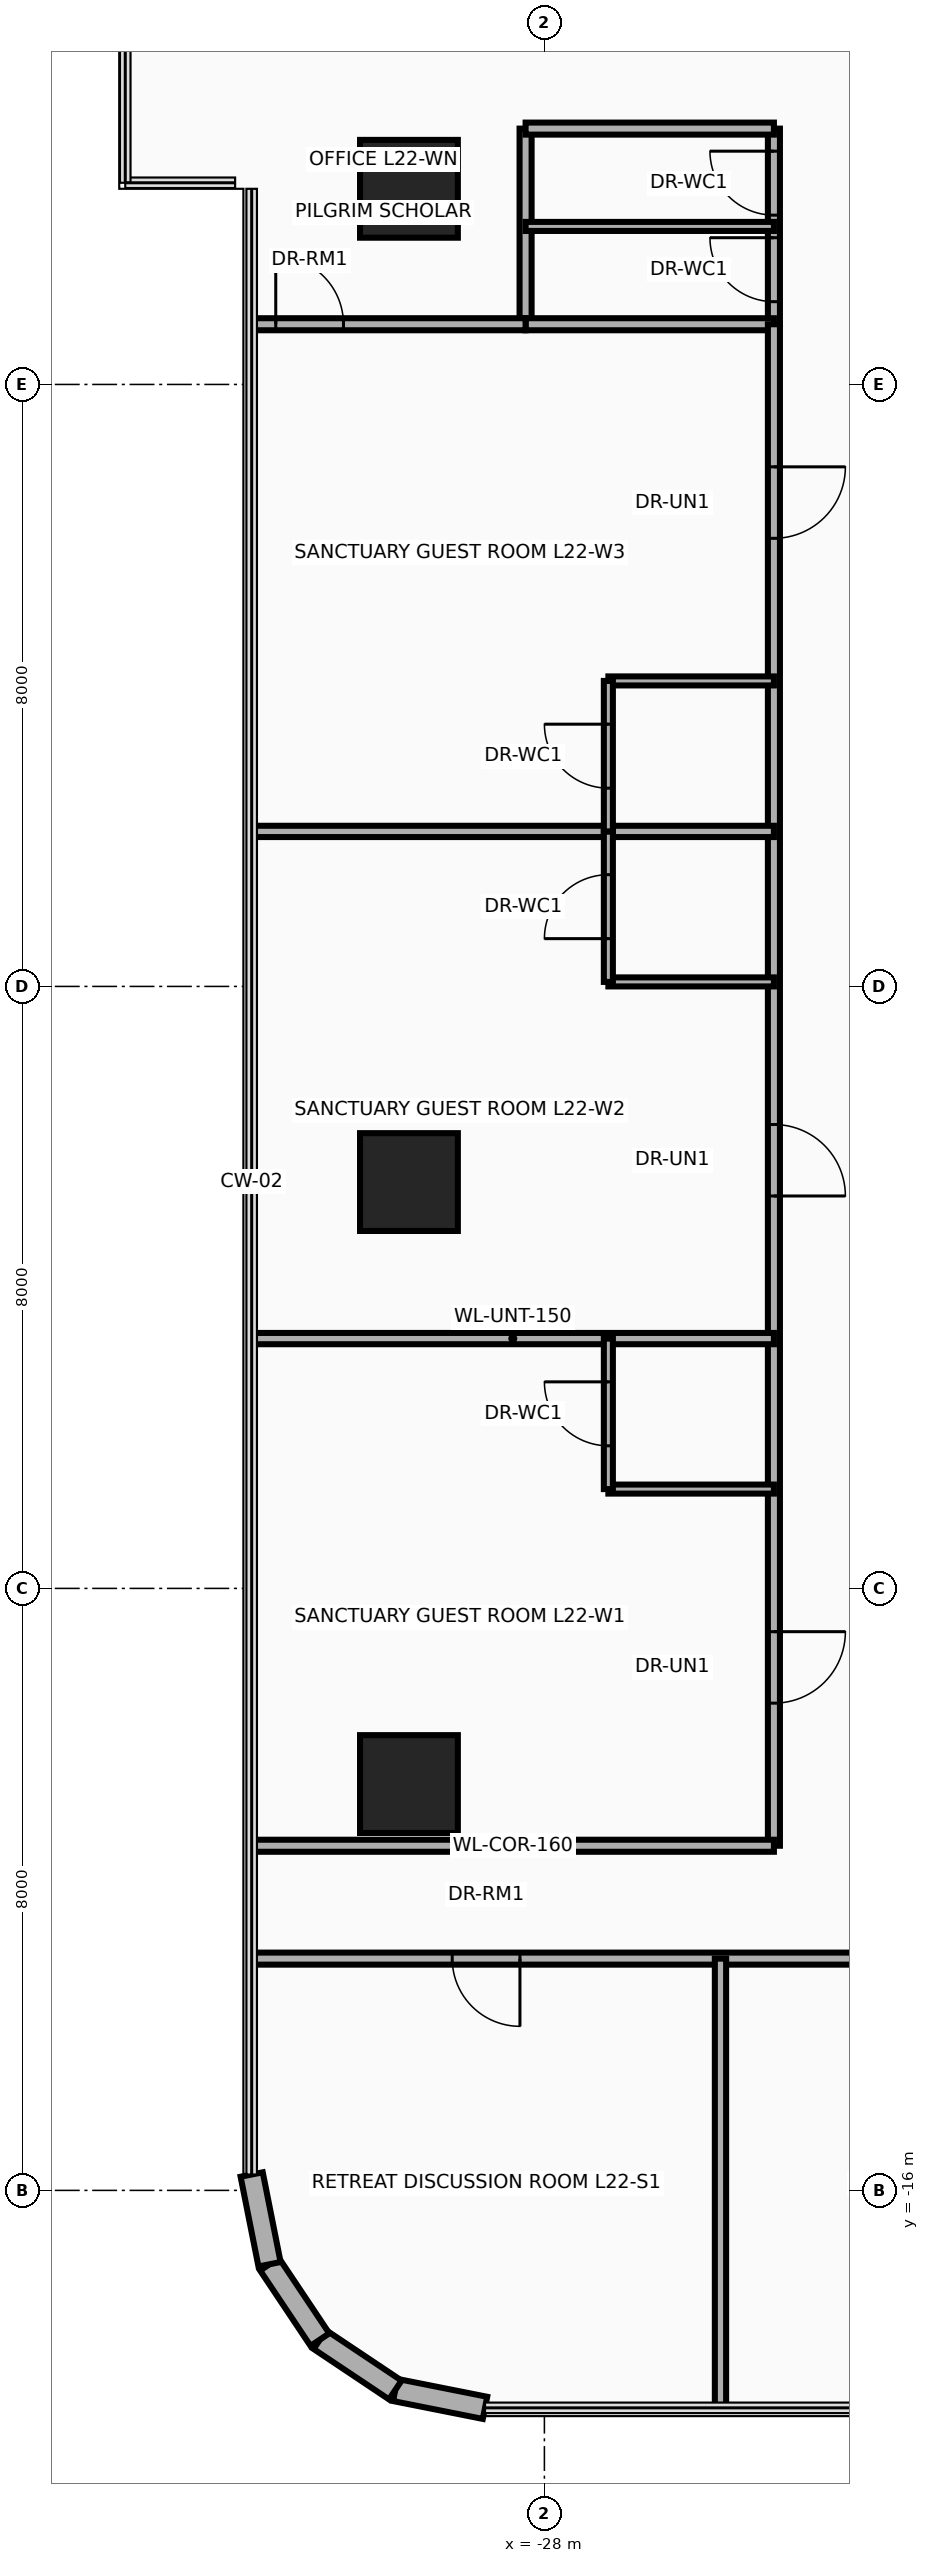
"""IFC4 building model, lengths in metres.
Left out: names, types, materials, properties, quantities, classifications, styles, units other than length and angle.
Written with IfcOpenShell. Run it as: python <this file> out.ifc"""

import sys

from ifc_helpers import new_model, si_unit, direction, frame, frame_2d, origin, origin_2d, place, context, subcontext, project, spatial, rectangle, circle, extrude, source, transform, mapped, element, fill, save


model = new_model("IFC4")
c1 = context("Model", 3, precision=1e-05, world=origin(), true_north=direction((0.0, 1.0)))
c2 = subcontext(c1, "Body", "Model", "MODEL_VIEW")
j1 = project(units=[si_unit("LENGTHUNIT", "METRE"), si_unit("PLANEANGLEUNIT", "RADIAN")], contexts=[c1])
p1 = place(None, origin())
s1 = spatial("IfcSite", under=j1, at=p1, CompositionType="ELEMENT")
p2 = place(p1, origin())
s2 = spatial("IfcBuilding", under=s1, at=p2, CompositionType="ELEMENT")
p3 = place(p2, frame((0.0, 0.0, 88.9)))
s3 = spatial("IfcBuildingStorey", under=s2, at=p3, CompositionType="ELEMENT", Elevation=88.9)
m1 = source(origin(), c2, "Body", "SweptSolid", [
    extrude(circle(Radius=0.65, at=origin_2d()), origin(), (0.0, 0.0, 1.0), 3.7),
])
for number, where, z_axis, x_axis in (
    (1, (-29.8, -10.6, 0.0), (0.0, 0.0, 1.0), (1.0, 0.0, 0.0)),
    (2, (-29.8, -2.6, 0.0), (0.0, 0.0, 1.0), (1.0, 0.0, 0.0)),
    (3, (-29.8, 10.6, 0.0), (0.0, 0.0, 1.0), (1.0, 0.0, 0.0)),
):
    element("IfcColumn", number, at=place(p3, frame(where, z_axis=z_axis, x_axis=x_axis)), inside=s3, PredefinedType="COLUMN", context=c2, shape_type="MappedRepresentation", body=[
        mapped(m1, transform((0.0, 0.0, 0.0), x_axis=(1.0, 0.0, 0.0), y_axis=(0.0, 1.0, 0.0), z_axis=(0.0, 0.0, 1.0), scale=1.0)),
    ])
p4 = place(p3, frame((-28.789, -18.89, 0.0), z_axis=(0.0, 0.0, 1.0), x_axis=(-0.980804027463, 0.194996050505, 0.0)))
e4 = element("IfcWall", 4, at=p4, inside=s3, PredefinedType="SOLIDWALL", context=c2, shape_type="SweptSolid", body=[
    extrude(rectangle(XDim=1.216, YDim=0.3, at=frame_2d((0.608, 0.0))), origin(), (0.0, 0.0, 1.0), 3.46),
])
for number, where, z_axis, x_axis in (
    (5, (-29.982, -18.653, 0.0), (0.0, 0.0, 1.0), (-0.831, 0.556, 0.0)),
    (6, (-30.983, -17.983, 0.0), (0.0, 0.0, 1.0), (-0.556, 0.831, 0.0)),
):
    element("IfcWall", number, at=place(p3, frame(where, z_axis=z_axis, x_axis=x_axis)), inside=s3, PredefinedType="SOLIDWALL", context=c2, shape_type="SweptSolid", body=[
        extrude(rectangle(XDim=1.205, YDim=0.3, at=frame_2d((0.603, 0.0))), origin(), (0.0, 0.0, 1.0), 3.46),
    ])
p5 = place(p3, frame((-31.653, -16.982, 0.0), z_axis=(0.0, 0.0, 1.0), x_axis=(-0.194996050505, 0.980804027463, 0.0)))
e7 = element("IfcWall", 7, at=p5, inside=s3, PredefinedType="SOLIDWALL", context=c2, shape_type="SweptSolid", body=[
    extrude(rectangle(XDim=1.216, YDim=0.3, at=frame_2d((0.608, 0.0))), origin(), (0.0, 0.0, 1.0), 3.46),
])
p6 = place(p3, frame((-28.25, 8.8, 0.0), z_axis=(0.0, 0.0, 1.0), x_axis=(0.0, 1.0, 0.0)))
e8 = element("IfcWall", 8, at=p6, inside=s3, PredefinedType="PARTITIONING", context=c2, shape_type="SweptSolid", body=[
    extrude(rectangle(XDim=2.6, YDim=0.16, at=frame_2d((1.3, 0.0))), origin(), (0.0, 0.0, 1.0), 2.583),
])
p7 = place(p3, frame((-24.95, 8.8, 0.0), z_axis=(0.0, 0.0, 1.0), x_axis=(0.0, 1.0, 0.0)))
e9 = element("IfcWall", 9, at=p7, inside=s3, PredefinedType="PARTITIONING", context=c2, shape_type="SweptSolid", body=[
    extrude(rectangle(XDim=2.6, YDim=0.16, at=frame_2d((1.3, 0.0))), origin(), (0.0, 0.0, 1.0), 2.583),
])
p8 = place(p7, frame((0.3, 0.0, 0.0)))
e10 = element("IfcOpeningElement", 10, at=p8, cuts=e9, PredefinedType="OPENING", context=c2, shape_type="SweptSolid", body=[
    extrude(rectangle(XDim=0.85, YDim=2.1, at=frame_2d((0.425, 1.05))), frame((0.0, 0.095, 0.0), z_axis=(0.0, -1.0, 0.0), x_axis=(1.0, 0.0, 0.0)), (0.0, 0.0, 1.0), 0.19),
])
p9 = place(p7, frame((1.45, 0.0, 0.0)))
e11 = element("IfcOpeningElement", 11, at=p9, cuts=e9, PredefinedType="OPENING", context=c2, shape_type="SweptSolid", body=[
    extrude(rectangle(XDim=0.85, YDim=2.1, at=frame_2d((0.425, 1.05))), frame((0.0, 0.095, 0.0), z_axis=(0.0, -1.0, 0.0), x_axis=(1.0, 0.0, 0.0)), (0.0, 0.0, 1.0), 0.19),
])
for number, where, z_axis, x_axis in (
    (12, (-28.25, 8.8, 0.0), (0.0, 0.0, 1.0), (1.0, 0.0, 0.0)),
    (13, (-28.25, 11.4, 0.0), (0.0, 0.0, 1.0), (1.0, 0.0, 0.0)),
):
    element("IfcWall", number, at=place(p3, frame(where, z_axis=z_axis, x_axis=x_axis)), inside=s3, PredefinedType="PARTITIONING", context=c2, shape_type="SweptSolid", body=[
        extrude(rectangle(XDim=3.3, YDim=0.16, at=frame_2d((1.65, 0.0))), origin(), (0.0, 0.0, 1.0), 3.46),
    ])
p10 = place(p3, frame((-28.25, 10.1, 0.0), z_axis=(0.0, 0.0, 1.0), x_axis=(1.0, 0.0, 0.0)))
e14 = element("IfcWall", 14, at=p10, inside=s3, PredefinedType="PARTITIONING", context=c2, shape_type="SweptSolid", body=[
    extrude(rectangle(XDim=3.3, YDim=0.12, at=frame_2d((1.65, 0.0))), origin(), (0.0, 0.0, 1.0), 3.46),
])
p11 = place(p3, frame((-24.95, -11.42, 0.0), z_axis=(0.0, 0.0, 1.0), x_axis=(0.0, 1.0, 0.0)))
e15 = element("IfcWall", 15, at=p11, inside=s3, PredefinedType="PARTITIONING", context=c2, shape_type="SweptSolid", body=[
    extrude(rectangle(XDim=20.22, YDim=0.16, at=frame_2d((10.11, 0.0))), origin(), (0.0, 0.0, 1.0), 2.583),
])
p12 = place(p11, frame((1.895, 0.0, 0.0)))
e16 = element("IfcOpeningElement", 16, at=p12, cuts=e15, PredefinedType="OPENING", context=c2, shape_type="SweptSolid", body=[
    extrude(rectangle(XDim=0.95, YDim=2.15, at=frame_2d((0.475, 1.075))), frame((0.0, 0.095, 0.0), z_axis=(0.0, -1.0, 0.0), x_axis=(1.0, 0.0, 0.0)), (0.0, 0.0, 1.0), 0.19),
])
p13 = place(p11, frame((8.635, 0.0, 0.0)))
e17 = element("IfcOpeningElement", 17, at=p13, cuts=e15, PredefinedType="OPENING", context=c2, shape_type="SweptSolid", body=[
    extrude(rectangle(XDim=0.95, YDim=2.15, at=frame_2d((0.475, 1.075))), frame((0.0, 0.095, 0.0), z_axis=(0.0, -1.0, 0.0), x_axis=(1.0, 0.0, 0.0)), (0.0, 0.0, 1.0), 0.19),
])
p14 = place(p11, frame((17.375, 0.0, 0.0)))
e18 = element("IfcOpeningElement", 18, at=p14, cuts=e15, PredefinedType="OPENING", context=c2, shape_type="SweptSolid", body=[
    extrude(rectangle(XDim=0.95, YDim=2.15, at=frame_2d((0.475, 1.075))), frame((0.0, 0.095, 0.0), z_axis=(0.0, -1.0, 0.0), x_axis=(1.0, 0.0, 0.0)), (0.0, 0.0, 1.0), 0.19),
])
p15 = place(p3, frame((-31.89, 8.8, 0.0), z_axis=(0.0, 0.0, 1.0), x_axis=(1.0, 0.0, 0.0)))
e19 = element("IfcWall", 19, at=p15, inside=s3, PredefinedType="PARTITIONING", context=c2, shape_type="SweptSolid", body=[
    extrude(rectangle(XDim=3.64, YDim=0.16, at=frame_2d((1.82, 0.0))), origin(), (0.0, 0.0, 1.0), 2.896),
])
p16 = place(p15, frame((0.32, 0.0, 0.0)))
e20 = element("IfcOpeningElement", 20, at=p16, cuts=e19, PredefinedType="OPENING", context=c2, shape_type="SweptSolid", body=[
    extrude(rectangle(XDim=0.9, YDim=2.1, at=frame_2d((0.45, 1.05))), frame((0.0, 0.095, 0.0), z_axis=(0.0, -1.0, 0.0), x_axis=(1.0, 0.0, 0.0)), (0.0, 0.0, 1.0), 0.19),
])
for number, where, z_axis, x_axis in (
    (21, (-31.89, -4.68, 0.0), (0.0, 0.0, 1.0), (1.0, 0.0, 0.0)),
    (22, (-31.89, 2.06, 0.0), (0.0, 0.0, 1.0), (1.0, 0.0, 0.0)),
):
    element("IfcWall", number, at=place(p3, frame(where, z_axis=z_axis, x_axis=x_axis)), inside=s3, PredefinedType="PARTITIONING", context=c2, shape_type="SweptSolid", body=[
        extrude(rectangle(XDim=6.94, YDim=0.15, at=frame_2d((3.47, 0.0))), origin(), (0.0, 0.0, 1.0), 2.896),
    ])
p17 = place(p3, frame((-27.15, -6.68, 0.0), z_axis=(0.0, 0.0, 1.0), x_axis=(1.0, 0.0, 0.0)))
e23 = element("IfcWall", 23, at=p17, inside=s3, PredefinedType="PARTITIONING", context=c2, shape_type="SweptSolid", body=[
    extrude(rectangle(XDim=2.2, YDim=0.12, at=frame_2d((1.1, 0.0))), origin(), (0.0, 0.0, 1.0), 2.979),
])
p18 = place(p3, frame((-27.15, -6.68, 0.0), z_axis=(0.0, 0.0, 1.0), x_axis=(0.0, 1.0, 0.0)))
e24 = element("IfcWall", 24, at=p18, inside=s3, PredefinedType="PARTITIONING", context=c2, shape_type="SweptSolid", body=[
    extrude(rectangle(XDim=2.0, YDim=0.12, at=frame_2d((1.0, 0.0))), origin(), (0.0, 0.0, 1.0), 2.979),
])
p19 = place(p18, frame((0.575, 0.0, 0.0)))
e25 = element("IfcOpeningElement", 25, at=p19, cuts=e24, PredefinedType="OPENING", context=c2, shape_type="SweptSolid", body=[
    extrude(rectangle(XDim=0.85, YDim=2.1, at=frame_2d((0.425, 1.05))), frame((0.0, 0.075, 0.0), z_axis=(0.0, -1.0, 0.0), x_axis=(1.0, 0.0, 0.0)), (0.0, 0.0, 1.0), 0.15),
])
p20 = place(p3, frame((-27.15, 0.06, 0.0), z_axis=(0.0, 0.0, 1.0), x_axis=(1.0, 0.0, 0.0)))
e26 = element("IfcWall", 26, at=p20, inside=s3, PredefinedType="PARTITIONING", context=c2, shape_type="SweptSolid", body=[
    extrude(rectangle(XDim=2.2, YDim=0.12, at=frame_2d((1.1, 0.0))), origin(), (0.0, 0.0, 1.0), 2.979),
])
p21 = place(p3, frame((-27.15, 0.06, 0.0), z_axis=(0.0, 0.0, 1.0), x_axis=(0.0, 1.0, 0.0)))
e27 = element("IfcWall", 27, at=p21, inside=s3, PredefinedType="PARTITIONING", context=c2, shape_type="SweptSolid", body=[
    extrude(rectangle(XDim=2.0, YDim=0.12, at=frame_2d((1.0, 0.0))), origin(), (0.0, 0.0, 1.0), 2.979),
])
p22 = place(p21, frame((0.575, 0.0, 0.0)))
e28 = element("IfcOpeningElement", 28, at=p22, cuts=e27, PredefinedType="OPENING", context=c2, shape_type="SweptSolid", body=[
    extrude(rectangle(XDim=0.85, YDim=2.1, at=frame_2d((0.425, 1.05))), frame((0.0, 0.075, 0.0), z_axis=(0.0, -1.0, 0.0), x_axis=(1.0, 0.0, 0.0)), (0.0, 0.0, 1.0), 0.15),
])
p23 = place(p3, frame((-27.15, 4.06, 0.0), z_axis=(0.0, 0.0, 1.0), x_axis=(1.0, 0.0, 0.0)))
e29 = element("IfcWall", 29, at=p23, inside=s3, PredefinedType="PARTITIONING", context=c2, shape_type="SweptSolid", body=[
    extrude(rectangle(XDim=2.2, YDim=0.12, at=frame_2d((1.1, 0.0))), origin(), (0.0, 0.0, 1.0), 3.46),
])
p24 = place(p3, frame((-27.15, 2.06, 0.0), z_axis=(0.0, 0.0, 1.0), x_axis=(0.0, 1.0, 0.0)))
e30 = element("IfcWall", 30, at=p24, inside=s3, PredefinedType="PARTITIONING", context=c2, shape_type="SweptSolid", body=[
    extrude(rectangle(XDim=2.0, YDim=0.12, at=frame_2d((1.0, 0.0))), origin(), (0.0, 0.0, 1.0), 2.979),
])
p25 = place(p24, frame((0.575, 0.0, 0.0)))
e31 = element("IfcOpeningElement", 31, at=p25, cuts=e30, PredefinedType="OPENING", context=c2, shape_type="SweptSolid", body=[
    extrude(rectangle(XDim=0.85, YDim=2.1, at=frame_2d((0.425, 1.05))), frame((0.0, 0.075, 0.0), z_axis=(0.0, -1.0, 0.0), x_axis=(1.0, 0.0, 0.0)), (0.0, 0.0, 1.0), 0.15),
])
p26 = place(p3, frame((-31.89, -12.92, 0.0), z_axis=(0.0, 0.0, 1.0), x_axis=(1.0, 0.0, 0.0)))
e32 = element("IfcWall", 32, at=p26, inside=s3, PredefinedType="PARTITIONING", context=c2, shape_type="SweptSolid", body=[
    extrude(rectangle(XDim=22.28, YDim=0.16, at=frame_2d((11.14, 0.0))), origin(), (0.0, 0.0, 1.0), 2.834),
])
p27 = place(p26, frame((2.665, 0.0, 0.0)))
e33 = element("IfcOpeningElement", 33, at=p27, cuts=e32, PredefinedType="OPENING", context=c2, shape_type="SweptSolid", body=[
    extrude(rectangle(XDim=0.9, YDim=2.1, at=frame_2d((0.45, 1.05))), frame((0.0, 0.095, 0.0), z_axis=(0.0, -1.0, 0.0), x_axis=(1.0, 0.0, 0.0)), (0.0, 0.0, 1.0), 0.19),
])
p28 = place(p26, frame((9.82, 0.0, 0.0)))
e34 = element("IfcOpeningElement", 34, at=p28, cuts=e32, PredefinedType="OPENING", context=c2, shape_type="SweptSolid", body=[
    extrude(rectangle(XDim=0.9, YDim=2.1, at=frame_2d((0.45, 1.05))), frame((0.0, 0.095, 0.0), z_axis=(0.0, -1.0, 0.0), x_axis=(1.0, 0.0, 0.0)), (0.0, 0.0, 1.0), 0.19),
])
p29 = place(p26, frame((17.845, 0.0, 0.0)))
e35 = element("IfcOpeningElement", 35, at=p29, cuts=e32, PredefinedType="OPENING", context=c2, shape_type="SweptSolid", body=[
    extrude(rectangle(XDim=0.9, YDim=2.1, at=frame_2d((0.45, 1.05))), frame((0.0, 0.095, 0.0), z_axis=(0.0, -1.0, 0.0), x_axis=(1.0, 0.0, 0.0)), (0.0, 0.0, 1.0), 0.19),
])
p30 = place(p3, frame((-25.66, -18.89, 0.0), z_axis=(0.0, 0.0, 1.0), x_axis=(0.0, 1.0, 0.0)))
e36 = element("IfcWall", 36, at=p30, inside=s3, PredefinedType="PARTITIONING", context=c2, shape_type="SweptSolid", body=[
    extrude(rectangle(XDim=5.97, YDim=0.15, at=frame_2d((2.985, 0.0))), origin(), (0.0, 0.0, 1.0), 3.46),
])
p31 = place(p3, frame((-31.89, -11.42, 0.0), z_axis=(0.0, 0.0, 1.0), x_axis=(1.0, 0.0, 0.0)))
e37 = element("IfcWall", 37, at=p31, inside=s3, PredefinedType="PARTITIONING", context=c2, shape_type="SweptSolid", body=[
    extrude(rectangle(XDim=6.94, YDim=0.16, at=frame_2d((3.47, 0.0))), origin(), (0.0, 0.0, 1.0), 3.46),
])
p32 = place(p8, origin())
e38 = element("IfcDoor", 38, at=p32, inside=s3, OperationType="SINGLE_SWING_RIGHT", PredefinedType="DOOR", context=c2, shape_type="SweptSolid", body=[
    extrude(rectangle(XDim=0.85, YDim=2.1, at=frame_2d((0.425, 1.05))), frame((0.0, 0.025, 0.0), z_axis=(0.0, -1.0, 0.0), x_axis=(1.0, 0.0, 0.0)), (0.0, 0.0, 1.0), 0.05),
])
fill(e10, e38)
p33 = place(p9, origin())
e39 = element("IfcDoor", 39, at=p33, inside=s3, OperationType="SINGLE_SWING_LEFT", PredefinedType="DOOR", context=c2, shape_type="SweptSolid", body=[
    extrude(rectangle(XDim=0.85, YDim=2.1, at=frame_2d((0.425, 1.05))), frame((0.0, 0.025, 0.0), z_axis=(0.0, -1.0, 0.0), x_axis=(1.0, 0.0, 0.0)), (0.0, 0.0, 1.0), 0.05),
])
fill(e11, e39)
p34 = place(p16, origin())
e40 = element("IfcDoor", 40, at=p34, inside=s3, OperationType="SINGLE_SWING_RIGHT", PredefinedType="DOOR", context=c2, shape_type="SweptSolid", body=[
    extrude(rectangle(XDim=0.9, YDim=2.1, at=frame_2d((0.45, 1.05))), frame((0.0, 0.025, 0.0), z_axis=(0.0, -1.0, 0.0), x_axis=(1.0, 0.0, 0.0)), (0.0, 0.0, 1.0), 0.05),
])
fill(e20, e40)
p35 = place(p12, frame((0.95, 0.0, 0.0), z_axis=(0.0, 0.0, 1.0), x_axis=(-1.0, 0.0, 0.0)))
e41 = element("IfcDoor", 41, at=p35, inside=s3, OperationType="SINGLE_SWING_LEFT", PredefinedType="DOOR", context=c2, shape_type="SweptSolid", body=[
    extrude(rectangle(XDim=0.95, YDim=2.15, at=frame_2d((0.475, 1.075))), frame((0.0, 0.025, 0.0), z_axis=(0.0, -1.0, 0.0), x_axis=(1.0, 0.0, 0.0)), (0.0, 0.0, 1.0), 0.05),
])
fill(e16, e41)
p36 = place(p19, origin())
e42 = element("IfcDoor", 42, at=p36, inside=s3, OperationType="SINGLE_SWING_RIGHT", PredefinedType="DOOR", context=c2, shape_type="SweptSolid", body=[
    extrude(rectangle(XDim=0.85, YDim=2.1, at=frame_2d((0.425, 1.05))), frame((0.0, 0.025, 0.0), z_axis=(0.0, -1.0, 0.0), x_axis=(1.0, 0.0, 0.0)), (0.0, 0.0, 1.0), 0.05),
])
fill(e25, e42)
p37 = place(p13, frame((0.95, 0.0, 0.0), z_axis=(0.0, 0.0, 1.0), x_axis=(-1.0, 0.0, 0.0)))
e43 = element("IfcDoor", 43, at=p37, inside=s3, OperationType="SINGLE_SWING_LEFT", PredefinedType="DOOR", context=c2, shape_type="SweptSolid", body=[
    extrude(rectangle(XDim=0.95, YDim=2.15, at=frame_2d((0.475, 1.075))), frame((0.0, 0.025, 0.0), z_axis=(0.0, -1.0, 0.0), x_axis=(1.0, 0.0, 0.0)), (0.0, 0.0, 1.0), 0.05),
])
fill(e17, e43)
p38 = place(p22, origin())
e44 = element("IfcDoor", 44, at=p38, inside=s3, OperationType="SINGLE_SWING_RIGHT", PredefinedType="DOOR", context=c2, shape_type="SweptSolid", body=[
    extrude(rectangle(XDim=0.85, YDim=2.1, at=frame_2d((0.425, 1.05))), frame((0.0, 0.025, 0.0), z_axis=(0.0, -1.0, 0.0), x_axis=(1.0, 0.0, 0.0)), (0.0, 0.0, 1.0), 0.05),
])
fill(e28, e44)
p39 = place(p14, frame((0.95, 0.0, 0.0), z_axis=(0.0, 0.0, 1.0), x_axis=(-1.0, 0.0, 0.0)))
e45 = element("IfcDoor", 45, at=p39, inside=s3, OperationType="SINGLE_SWING_LEFT", PredefinedType="DOOR", context=c2, shape_type="SweptSolid", body=[
    extrude(rectangle(XDim=0.95, YDim=2.15, at=frame_2d((0.475, 1.075))), frame((0.0, 0.025, 0.0), z_axis=(0.0, -1.0, 0.0), x_axis=(1.0, 0.0, 0.0)), (0.0, 0.0, 1.0), 0.05),
])
fill(e18, e45)
p40 = place(p25, origin())
e46 = element("IfcDoor", 46, at=p40, inside=s3, OperationType="SINGLE_SWING_RIGHT", PredefinedType="DOOR", context=c2, shape_type="SweptSolid", body=[
    extrude(rectangle(XDim=0.85, YDim=2.1, at=frame_2d((0.425, 1.05))), frame((0.0, 0.025, 0.0), z_axis=(0.0, -1.0, 0.0), x_axis=(1.0, 0.0, 0.0)), (0.0, 0.0, 1.0), 0.05),
])
fill(e31, e46)
p41 = place(p27, frame((0.9, 0.0, 0.0), z_axis=(0.0, 0.0, 1.0), x_axis=(-1.0, 0.0, 0.0)))
e47 = element("IfcDoor", 47, at=p41, inside=s3, OperationType="SINGLE_SWING_LEFT", PredefinedType="DOOR", context=c2, shape_type="SweptSolid", body=[
    extrude(rectangle(XDim=0.9, YDim=2.1, at=frame_2d((0.45, 1.05))), frame((0.0, 0.025, 0.0), z_axis=(0.0, -1.0, 0.0), x_axis=(1.0, 0.0, 0.0)), (0.0, 0.0, 1.0), 0.05),
])
fill(e33, e47)
save(model, sys.argv[1])
